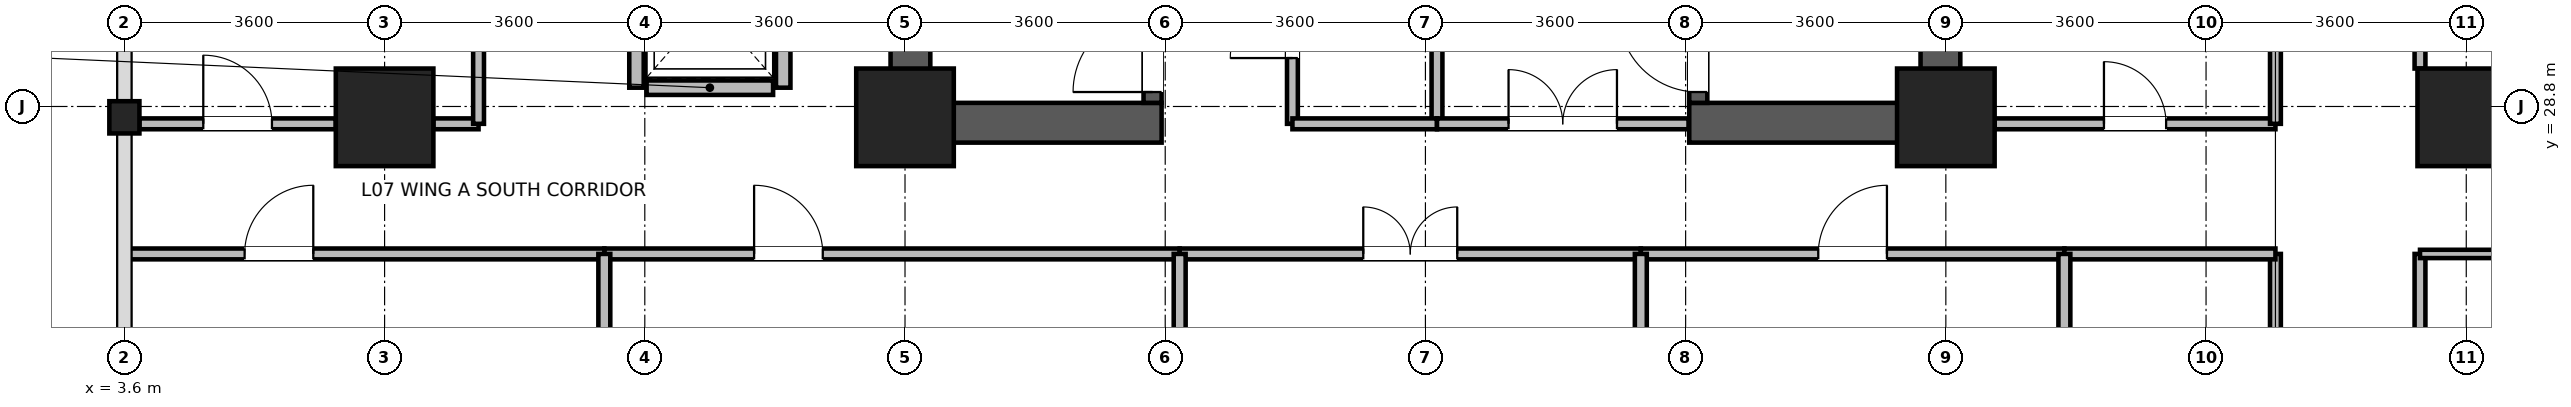
"""IFC4 building model, lengths in metres.
Left out: names, types, materials, properties, quantities, classifications, styles, units other than length and angle.
Written with IfcOpenShell. Run it as: python <this file> out.ifc"""

import sys

from ifc_helpers import new_model, si_unit, direction, frame, frame_2d, origin, origin_2d, place, context, subcontext, project, spatial, rectangle, i_section, extrude, source, transform, mapped, element, fill, save


model = new_model("IFC4")
c1 = context("Model", 3, precision=1e-05, world=origin(), true_north=direction((0.0, 1.0)))
c2 = subcontext(c1, "Body", "Model", "MODEL_VIEW")
j1 = project(units=[si_unit("LENGTHUNIT", "METRE"), si_unit("PLANEANGLEUNIT", "RADIAN")], contexts=[c1])
p1 = place(None, origin())
s1 = spatial("IfcSite", under=j1, at=p1, CompositionType="ELEMENT")
p2 = place(p1, origin())
s2 = spatial("IfcBuilding", under=s1, at=p2, CompositionType="ELEMENT")
p3 = place(p2, frame((0.0, 0.0, 32.7)))
s3 = spatial("IfcBuildingStorey", under=s2, at=p3, CompositionType="ELEMENT", Elevation=32.7)
for number, where, z_axis, x_axis in (
    (1, (14.475, 28.3, 0.0), (0.0, 0.0, 1.0), (0.0, 1.0, 0.0)),
    (2, (28.725, 28.3, 0.0), (0.0, 0.0, 1.0), (0.0, 1.0, 0.0)),
):
    element("IfcWall", number, at=place(p3, frame(where, z_axis=z_axis, x_axis=x_axis)), inside=s3, PredefinedType="SHEAR", context=c2, shape_type="SweptSolid", body=[
        extrude(rectangle(XDim=8.1, YDim=0.55, at=frame_2d((4.05, 0.0))), origin(), (0.0, 0.0, 1.0), 3.45),
    ])
for number, where, z_axis, x_axis in (
    (3, (14.75, 28.575, 0.0), (0.0, 0.0, 1.0), (1.0, 0.0, 0.0)),
    (4, (25.25, 28.575, 0.0), (0.0, 0.0, 1.0), (1.0, 0.0, 0.0)),
):
    element("IfcWall", number, at=place(p3, frame(where, z_axis=z_axis, x_axis=x_axis)), inside=s3, PredefinedType="SHEAR", context=c2, shape_type="SweptSolid", body=[
        extrude(rectangle(XDim=3.2, YDim=0.55, at=frame_2d((1.6, 0.0))), origin(), (0.0, 0.0, 1.0), 3.45),
    ])
p4 = place(p3, frame((17.825, 28.85, 0.0), z_axis=(0.0, 0.0, 1.0), x_axis=(0.0, 1.0, 0.0)))
e5 = element("IfcWall", 5, at=p4, inside=s3, PredefinedType="SHEAR", context=c2, shape_type="SweptSolid", body=[
    extrude(rectangle(XDim=7.0, YDim=0.25, at=frame_2d((3.5, 0.0))), origin(), (0.0, 0.0, 1.0), 3.45),
])
p5 = place(p4, frame((0.15, 0.0, 0.0)))
e6 = element("IfcOpeningElement", 6, at=p5, cuts=e5, PredefinedType="OPENING", context=c2, shape_type="SweptSolid", body=[
    extrude(rectangle(XDim=1.1, YDim=2.08, at=frame_2d((0.55, 1.04))), frame((0.0, 0.135, 0.0), z_axis=(0.0, -1.0, 0.0), x_axis=(1.0, 0.0, 0.0)), (0.0, 0.0, 1.0), 0.27),
])
p6 = place(p3, frame((25.375, 28.85, 0.0), z_axis=(0.0, 0.0, 1.0), x_axis=(0.0, 1.0, 0.0)))
e7 = element("IfcWall", 7, at=p6, inside=s3, PredefinedType="SHEAR", context=c2, shape_type="SweptSolid", body=[
    extrude(rectangle(XDim=7.0, YDim=0.25, at=frame_2d((3.5, 0.0))), origin(), (0.0, 0.0, 1.0), 3.45),
])
p7 = place(p6, frame((0.15, 0.0, 0.0)))
e8 = element("IfcOpeningElement", 8, at=p7, cuts=e7, PredefinedType="OPENING", context=c2, shape_type="SweptSolid", body=[
    extrude(rectangle(XDim=1.1, YDim=2.08, at=frame_2d((0.55, 1.04))), frame((0.0, 0.135, 0.0), z_axis=(0.0, -1.0, 0.0), x_axis=(1.0, 0.0, 0.0)), (0.0, 0.0, 1.0), 0.27),
])
m1 = source(origin(), c2, "Body", "SweptSolid", [
    extrude(rectangle(XDim=1.35, YDim=1.35, at=origin_2d()), origin(), (0.0, 0.0, 1.0), 3.7),
])
for number, where, z_axis, x_axis in (
    (9, (7.2, 28.65, 0.0), (0.0, 0.0, 1.0), (1.0, 0.0, 0.0)),
    (10, (14.4, 28.65, 0.0), (0.0, 0.0, 1.0), (1.0, 0.0, 0.0)),
    (11, (28.8, 28.65, 0.0), (0.0, 0.0, 1.0), (1.0, 0.0, 0.0)),
    (12, (36.0, 28.65, 0.0), (0.0, 0.0, 1.0), (1.0, 0.0, 0.0)),
):
    element("IfcColumn", number, at=place(p3, frame(where, z_axis=z_axis, x_axis=x_axis)), inside=s3, PredefinedType="COLUMN", context=c2, shape_type="MappedRepresentation", body=[
        mapped(m1, transform((0.0, 0.0, 0.0), x_axis=(1.0, 0.0, 0.0), y_axis=(0.0, 1.0, 0.0), z_axis=(0.0, 0.0, 1.0), scale=1.0)),
    ])
m2 = source(origin(), c2, "Body", "SweptSolid", [
    extrude(i_section(OverallWidth=0.416, OverallDepth=0.446, WebThickness=0.029, FlangeThickness=0.04, FilletRadius=0.015, at=origin_2d()), origin(), (0.0, 0.0, 1.0), 3.7),
])
p8 = place(p3, frame((3.6, 28.65, 0.0), z_axis=(0.0, 0.0, 1.0), x_axis=(1.0, 0.0, 0.0)))
e13 = element("IfcColumn", 13, at=p8, inside=s3, PredefinedType="COLUMN", context=c2, shape_type="MappedRepresentation", body=[
    mapped(m2, transform((0.0, 0.0, 0.0), x_axis=(1.0, 0.0, 0.0), y_axis=(0.0, 1.0, 0.0), z_axis=(0.0, 0.0, 1.0), scale=1.0)),
])
p9 = place(p3, frame((10.825, 29.06, 0.0), z_axis=(0.0, 0.0, 1.0), x_axis=(1.0, 0.0, 0.0)))
e14 = element("IfcWall", 14, at=p9, inside=s3, PredefinedType="PARTITIONING", context=c2, shape_type="SweptSolid", body=[
    extrude(rectangle(XDim=1.75, YDim=0.2, at=frame_2d((0.875, 0.0))), origin(), (0.0, 0.0, 1.0), 3.43),
])
for number, where, z_axis, x_axis in (
    (15, (10.685, 29.06, 0.0), (0.0, 0.0, 1.0), (0.0, 1.0, 0.0)),
    (16, (12.715, 29.06, 0.0), (0.0, 0.0, 1.0), (0.0, 1.0, 0.0)),
):
    element("IfcWall", number, at=place(p3, frame(where, z_axis=z_axis, x_axis=x_axis)), inside=s3, PredefinedType="PARTITIONING", context=c2, shape_type="SweptSolid", body=[
        extrude(rectangle(XDim=2.28, YDim=0.2, at=frame_2d((1.14, 0.0))), origin(), (0.0, 0.0, 1.0), 3.43),
    ])
p10 = place(p3, frame((35.36, 22.275, 0.0), z_axis=(0.0, 0.0, 1.0), x_axis=(0.0, 1.0, 0.0)))
e17 = element("IfcWall", 17, at=p10, inside=s3, PredefinedType="PARTITIONING", context=c2, shape_type="SweptSolid", body=[
    extrude(rectangle(XDim=4.485, YDim=0.15, at=frame_2d((2.243, 0.0))), origin(), (0.0, 0.0, 1.0), 3.43),
])
p11 = place(p3, frame((10.24, 26.76, 0.0), z_axis=(0.0, 0.0, 1.0), x_axis=(1.0, 0.0, 0.0)))
e18 = element("IfcWall", 18, at=p11, inside=s3, PredefinedType="PARTITIONING", context=c2, shape_type="SweptSolid", body=[
    extrude(rectangle(XDim=7.96, YDim=0.15, at=frame_2d((3.98, 0.0))), origin(), (0.0, 0.0, 1.0), 3.43),
])
p12 = place(p11, frame((2.072, 0.0, 0.0)))
e19 = element("IfcOpeningElement", 19, at=p12, cuts=e18, PredefinedType="OPENING", context=c2, shape_type="SweptSolid", body=[
    extrude(rectangle(XDim=0.95, YDim=2.1, at=frame_2d((0.475, 1.05))), frame((0.0, 0.085, 0.0), z_axis=(0.0, -1.0, 0.0), x_axis=(1.0, 0.0, 0.0)), (0.0, 0.0, 1.0), 0.17),
])
p13 = place(p3, frame((35.36, 29.325, 0.0), z_axis=(0.0, 0.0, 1.0), x_axis=(0.0, 1.0, 0.0)))
e20 = element("IfcWall", 20, at=p13, inside=s3, PredefinedType="PARTITIONING", context=c2, shape_type="SweptSolid", body=[
    extrude(rectangle(XDim=6.15, YDim=0.15, at=frame_2d((3.075, 0.0))), origin(), (0.0, 0.0, 1.0), 3.43),
])
p14 = place(p13, frame((2.425, 0.0, 0.0)))
e21 = element("IfcOpeningElement", 21, at=p14, cuts=e20, PredefinedType="OPENING", context=c2, shape_type="SweptSolid", body=[
    extrude(rectangle(XDim=1.3, YDim=2.12, at=frame_2d((0.65, 1.06))), frame((0.0, 0.085, 0.0), z_axis=(0.0, -1.0, 0.0), x_axis=(1.0, 0.0, 0.0)), (0.0, 0.0, 1.0), 0.17),
])
p15 = place(p3, frame((3.62, 26.76, 0.0), z_axis=(0.0, 0.0, 1.0), x_axis=(1.0, 0.0, 0.0)))
e22 = element("IfcWall", 22, at=p15, inside=s3, PredefinedType="PARTITIONING", context=c2, shape_type="SweptSolid", body=[
    extrude(rectangle(XDim=6.62, YDim=0.15, at=frame_2d((3.31, 0.0))), origin(), (0.0, 0.0, 1.0), 3.43),
])
p16 = place(p15, frame((1.643, 0.0, 0.0)))
e23 = element("IfcOpeningElement", 23, at=p16, cuts=e22, PredefinedType="OPENING", context=c2, shape_type="SweptSolid", body=[
    extrude(rectangle(XDim=0.95, YDim=2.1, at=frame_2d((0.475, 1.05))), frame((0.0, 0.085, 0.0), z_axis=(0.0, -1.0, 0.0), x_axis=(1.0, 0.0, 0.0)), (0.0, 0.0, 1.0), 0.17),
])
p17 = place(p3, frame((18.2, 26.76, 0.0), z_axis=(0.0, 0.0, 1.0), x_axis=(1.0, 0.0, 0.0)))
e24 = element("IfcWall", 24, at=p17, inside=s3, PredefinedType="PARTITIONING", context=c2, shape_type="SweptSolid", body=[
    extrude(rectangle(XDim=6.38, YDim=0.15, at=frame_2d((3.19, 0.0))), origin(), (0.0, 0.0, 1.0), 3.43),
])
p18 = place(p17, frame((2.54, 0.0, 0.0)))
e25 = element("IfcOpeningElement", 25, at=p18, cuts=e24, PredefinedType="OPENING", context=c2, shape_type="SweptSolid", body=[
    extrude(rectangle(XDim=1.3, YDim=2.12, at=frame_2d((0.65, 1.06))), frame((0.0, 0.085, 0.0), z_axis=(0.0, -1.0, 0.0), x_axis=(1.0, 0.0, 0.0)), (0.0, 0.0, 1.0), 0.17),
])
p19 = place(p3, frame((24.58, 26.76, 0.0), z_axis=(0.0, 0.0, 1.0), x_axis=(1.0, 0.0, 0.0)))
e26 = element("IfcWall", 26, at=p19, inside=s3, PredefinedType="PARTITIONING", context=c2, shape_type="SweptSolid", body=[
    extrude(rectangle(XDim=5.86, YDim=0.15, at=frame_2d((2.93, 0.0))), origin(), (0.0, 0.0, 1.0), 3.43),
])
p20 = place(p19, frame((2.455, 0.0, 0.0)))
e27 = element("IfcOpeningElement", 27, at=p20, cuts=e26, PredefinedType="OPENING", context=c2, shape_type="SweptSolid", body=[
    extrude(rectangle(XDim=0.95, YDim=2.1, at=frame_2d((0.475, 1.05))), frame((0.0, 0.085, 0.0), z_axis=(0.0, -1.0, 0.0), x_axis=(1.0, 0.0, 0.0)), (0.0, 0.0, 1.0), 0.17),
])
p21 = place(p3, frame((33.36, 21.6, 0.0), z_axis=(0.0, 0.0, 1.0), x_axis=(0.0, 1.0, 0.0)))
e28 = element("IfcWall", 28, at=p21, inside=s3, PredefinedType="PARTITIONING", context=c2, shape_type="SweptSolid", body=[
    extrude(rectangle(XDim=5.16, YDim=0.15, at=frame_2d((2.58, 0.0))), origin(), (0.0, 0.0, 1.0), 3.43),
])
p22 = place(p21, frame((2.15, 0.0, 0.0)))
e29 = element("IfcOpeningElement", 29, at=p22, cuts=e28, PredefinedType="OPENING", context=c2, shape_type="SweptSolid", body=[
    extrude(rectangle(XDim=0.86, YDim=2.02, at=frame_2d((0.43, 1.01))), frame((0.0, 0.085, 0.0), z_axis=(0.0, -1.0, 0.0), x_axis=(1.0, 0.0, 0.0)), (0.0, 0.0, 1.0), 0.17),
])
p23 = place(p3, frame((3.808, 28.56, 0.0), z_axis=(0.0, 0.0, 1.0), x_axis=(1.0, 0.0, 0.0)))
e30 = element("IfcWall", 30, at=p23, inside=s3, PredefinedType="PARTITIONING", context=c2, shape_type="SweptSolid", body=[
    extrude(rectangle(XDim=2.717, YDim=0.15, at=frame_2d((1.358, 0.0))), origin(), (0.0, 0.0, 1.0), 2.78),
])
p24 = place(p23, frame((0.884, 0.0, 0.0)))
e31 = element("IfcOpeningElement", 31, at=p24, cuts=e30, PredefinedType="OPENING", context=c2, shape_type="SweptSolid", body=[
    extrude(rectangle(XDim=0.95, YDim=2.1, at=frame_2d((0.475, 1.05))), frame((0.0, 0.085, 0.0), z_axis=(0.0, -1.0, 0.0), x_axis=(1.0, 0.0, 0.0)), (0.0, 0.0, 1.0), 0.17),
])
p25 = place(p3, frame((7.875, 28.56, 0.0), z_axis=(0.0, 0.0, 1.0), x_axis=(1.0, 0.0, 0.0)))
e32 = element("IfcWall", 32, at=p25, inside=s3, PredefinedType="PARTITIONING", context=c2, shape_type="SweptSolid", body=[
    extrude(rectangle(XDim=0.625, YDim=0.15, at=frame_2d((0.312, 0.0))), origin(), (0.0, 0.0, 1.0), 2.78),
])
p26 = place(p3, frame((29.475, 28.56, 0.0), z_axis=(0.0, 0.0, 1.0), x_axis=(1.0, 0.0, 0.0)))
e33 = element("IfcWall", 33, at=p26, inside=s3, PredefinedType="PARTITIONING", context=c2, shape_type="SweptSolid", body=[
    extrude(rectangle(XDim=3.885, YDim=0.15, at=frame_2d((1.942, 0.0))), origin(), (0.0, 0.0, 1.0), 2.78),
])
p27 = place(p26, frame((1.512, 0.0, 0.0)))
e34 = element("IfcOpeningElement", 34, at=p27, cuts=e33, PredefinedType="OPENING", context=c2, shape_type="SweptSolid", body=[
    extrude(rectangle(XDim=0.86, YDim=2.02, at=frame_2d((0.43, 1.01))), frame((0.0, 0.085, 0.0), z_axis=(0.0, -1.0, 0.0), x_axis=(1.0, 0.0, 0.0)), (0.0, 0.0, 1.0), 0.17),
])
p28 = place(p3, frame((8.5, 28.56, 0.0), z_axis=(0.0, 0.0, 1.0), x_axis=(0.0, 1.0, 0.0)))
e35 = element("IfcWall", 35, at=p28, inside=s3, PredefinedType="PARTITIONING", context=c2, shape_type="SweptSolid", body=[
    extrude(rectangle(XDim=3.84, YDim=0.15, at=frame_2d((1.92, 0.0))), origin(), (0.0, 0.0, 1.0), 3.43),
])
p29 = place(p3, frame((33.36, 28.56, 0.0), z_axis=(0.0, 0.0, 1.0), x_axis=(0.0, 1.0, 0.0)))
e36 = element("IfcWall", 36, at=p29, inside=s3, PredefinedType="PARTITIONING", context=c2, shape_type="SweptSolid", body=[
    extrude(rectangle(XDim=3.08, YDim=0.15, at=frame_2d((1.54, 0.0))), origin(), (0.0, 0.0, 1.0), 3.43),
])
p30 = place(p3, frame((30.44, 26.76, 0.0), z_axis=(0.0, 0.0, 1.0), x_axis=(1.0, 0.0, 0.0)))
e37 = element("IfcWall", 37, at=p30, inside=s3, PredefinedType="PARTITIONING", context=c2, shape_type="SweptSolid", body=[
    extrude(rectangle(XDim=2.92, YDim=0.15, at=frame_2d((1.46, 0.0))), origin(), (0.0, 0.0, 1.0), 3.43),
])
p31 = place(p3, frame((19.76, 28.56, 0.0), z_axis=(0.0, 0.0, 1.0), x_axis=(0.0, 1.0, 0.0)))
e38 = element("IfcWall", 38, at=p31, inside=s3, PredefinedType="PARTITIONING", context=c2, shape_type="SweptSolid", body=[
    extrude(rectangle(XDim=2.68, YDim=0.15, at=frame_2d((1.34, 0.0))), origin(), (0.0, 0.0, 1.0), 3.43),
])
p32 = place(p31, frame((0.91, 0.0, 0.0)))
e39 = element("IfcOpeningElement", 39, at=p32, cuts=e38, PredefinedType="OPENING", context=c2, shape_type="SweptSolid", body=[
    extrude(rectangle(XDim=0.86, YDim=2.02, at=frame_2d((0.43, 1.01))), frame((0.0, 0.085, 0.0), z_axis=(0.0, -1.0, 0.0), x_axis=(1.0, 0.0, 0.0)), (0.0, 0.0, 1.0), 0.17),
])
p33 = place(p3, frame((21.76, 28.56, 0.0), z_axis=(0.0, 0.0, 1.0), x_axis=(0.0, 1.0, 0.0)))
e40 = element("IfcWall", 40, at=p33, inside=s3, PredefinedType="PARTITIONING", context=c2, shape_type="SweptSolid", body=[
    extrude(rectangle(XDim=2.68, YDim=0.15, at=frame_2d((1.34, 0.0))), origin(), (0.0, 0.0, 1.0), 3.43),
])
p34 = place(p3, frame((19.76, 28.56, 0.0), z_axis=(0.0, 0.0, 1.0), x_axis=(1.0, 0.0, 0.0)))
e41 = element("IfcWall", 41, at=p34, inside=s3, PredefinedType="PARTITIONING", context=c2, shape_type="SweptSolid", body=[
    extrude(rectangle(XDim=2.0, YDim=0.15, at=frame_2d((1.0, 0.0))), origin(), (0.0, 0.0, 1.0), 2.23),
])
p35 = place(p3, frame((18.2, 21.732, 0.0), z_axis=(0.0, 0.0, 1.0), x_axis=(0.0, 1.0, 0.0)))
e42 = element("IfcWall", 42, at=p35, inside=s3, PredefinedType="PARTITIONING", context=c2, shape_type="SweptSolid", body=[
    extrude(rectangle(XDim=5.028, YDim=0.165, at=frame_2d((2.514, 0.0))), origin(), (0.0, 0.0, 1.0), 3.07),
])
p36 = place(p3, frame((24.58, 21.732, 0.0), z_axis=(0.0, 0.0, 1.0), x_axis=(0.0, 1.0, 0.0)))
e43 = element("IfcWall", 43, at=p36, inside=s3, PredefinedType="PARTITIONING", context=c2, shape_type="SweptSolid", body=[
    extrude(rectangle(XDim=5.028, YDim=0.165, at=frame_2d((2.514, 0.0))), origin(), (0.0, 0.0, 1.0), 3.43),
])
p37 = place(p3, frame((30.44, 21.6, 0.0), z_axis=(0.0, 0.0, 1.0), x_axis=(0.0, 1.0, 0.0)))
e44 = element("IfcWall", 44, at=p37, inside=s3, PredefinedType="PARTITIONING", context=c2, shape_type="SweptSolid", body=[
    extrude(rectangle(XDim=5.16, YDim=0.165, at=frame_2d((2.58, 0.0))), origin(), (0.0, 0.0, 1.0), 3.43),
])
p38 = place(p3, frame((35.36, 26.76, 0.0), z_axis=(0.0, 0.0, 1.0), x_axis=(1.0, 0.0, 0.0)))
e45 = element("IfcWall", 45, at=p38, inside=s3, PredefinedType="PARTITIONING", context=c2, shape_type="SweptSolid", body=[
    extrude(rectangle(XDim=4.92, YDim=0.115, at=frame_2d((2.46, 0.0))), origin(), (0.0, 0.0, 1.0), 3.43),
])
p39 = place(p3, frame((21.76, 28.56, 0.0), z_axis=(0.0, 0.0, 1.0), x_axis=(1.0, 0.0, 0.0)))
e46 = element("IfcWall", 46, at=p39, inside=s3, PredefinedType="PARTITIONING", context=c2, shape_type="SweptSolid", body=[
    extrude(rectangle(XDim=3.48, YDim=0.15, at=frame_2d((1.74, 0.0))), origin(), (0.0, 0.0, 1.0), 2.23),
])
p40 = place(p39, frame((0.99, 0.0, 0.0)))
e47 = element("IfcOpeningElement", 47, at=p40, cuts=e46, PredefinedType="OPENING", context=c2, shape_type="SweptSolid", body=[
    extrude(rectangle(XDim=1.5, YDim=2.1, at=frame_2d((0.75, 1.05))), frame((0.0, 0.085, 0.0), z_axis=(0.0, -1.0, 0.0), x_axis=(1.0, 0.0, 0.0)), (0.0, 0.0, 1.0), 0.17),
])
p41 = place(p3, frame((10.24, 23.5, 0.0), z_axis=(0.0, 0.0, 1.0), x_axis=(0.0, 1.0, 0.0)))
e48 = element("IfcWall", 48, at=p41, inside=s3, PredefinedType="PARTITIONING", context=c2, shape_type="SweptSolid", body=[
    extrude(rectangle(XDim=3.26, YDim=0.165, at=frame_2d((1.63, 0.0))), origin(), (0.0, 0.0, 1.0), 3.43),
])
p42 = place(p5, origin())
e49 = element("IfcDoor", 49, at=p42, inside=s3, OperationType="SINGLE_SWING_LEFT", PredefinedType="DOOR", context=c2, shape_type="SweptSolid", body=[
    extrude(rectangle(XDim=1.1, YDim=2.08, at=frame_2d((0.55, 1.04))), frame((0.0, 0.025, 0.0), z_axis=(0.0, -1.0, 0.0), x_axis=(1.0, 0.0, 0.0)), (0.0, 0.0, 1.0), 0.05),
])
fill(e6, e49)
p43 = place(p7, origin())
e50 = element("IfcDoor", 50, at=p43, inside=s3, OperationType="SINGLE_SWING_RIGHT", PredefinedType="DOOR", context=c2, shape_type="SweptSolid", body=[
    extrude(rectangle(XDim=1.1, YDim=2.08, at=frame_2d((0.55, 1.04))), frame((0.0, 0.025, 0.0), z_axis=(0.0, -1.0, 0.0), x_axis=(1.0, 0.0, 0.0)), (0.0, 0.0, 1.0), 0.05),
])
fill(e8, e50)
p44 = place(p12, origin())
e51 = element("IfcDoor", 51, at=p44, inside=s3, OperationType="SINGLE_SWING_LEFT", PredefinedType="DOOR", context=c2, shape_type="SweptSolid", body=[
    extrude(rectangle(XDim=0.95, YDim=2.1, at=frame_2d((0.475, 1.05))), frame((0.0, 0.025, 0.0), z_axis=(0.0, -1.0, 0.0), x_axis=(1.0, 0.0, 0.0)), (0.0, 0.0, 1.0), 0.05),
])
fill(e19, e51)
p45 = place(p16, origin())
e52 = element("IfcDoor", 52, at=p45, inside=s3, OperationType="SINGLE_SWING_RIGHT", PredefinedType="DOOR", context=c2, shape_type="SweptSolid", body=[
    extrude(rectangle(XDim=0.95, YDim=2.1, at=frame_2d((0.475, 1.05))), frame((0.0, 0.025, 0.0), z_axis=(0.0, -1.0, 0.0), x_axis=(1.0, 0.0, 0.0)), (0.0, 0.0, 1.0), 0.05),
])
fill(e23, e52)
p46 = place(p18, origin())
e53 = element("IfcDoor", 53, at=p46, inside=s3, OperationType="DOUBLE_DOOR_SINGLE_SWING", PredefinedType="DOOR", context=c2, shape_type="SweptSolid", body=[
    extrude(rectangle(XDim=1.3, YDim=2.12, at=frame_2d((0.65, 1.06))), frame((0.0, 0.025, 0.0), z_axis=(0.0, -1.0, 0.0), x_axis=(1.0, 0.0, 0.0)), (0.0, 0.0, 1.0), 0.05),
])
fill(e25, e53)
p47 = place(p20, origin())
e54 = element("IfcDoor", 54, at=p47, inside=s3, OperationType="SINGLE_SWING_RIGHT", PredefinedType="DOOR", context=c2, shape_type="SweptSolid", body=[
    extrude(rectangle(XDim=0.95, YDim=2.1, at=frame_2d((0.475, 1.05))), frame((0.0, 0.025, 0.0), z_axis=(0.0, -1.0, 0.0), x_axis=(1.0, 0.0, 0.0)), (0.0, 0.0, 1.0), 0.05),
])
fill(e27, e54)
p48 = place(p24, origin())
e55 = element("IfcDoor", 55, at=p48, inside=s3, OperationType="SINGLE_SWING_LEFT", PredefinedType="DOOR", context=c2, shape_type="SweptSolid", body=[
    extrude(rectangle(XDim=0.95, YDim=2.1, at=frame_2d((0.475, 1.05))), frame((0.0, 0.025, 0.0), z_axis=(0.0, -1.0, 0.0), x_axis=(1.0, 0.0, 0.0)), (0.0, 0.0, 1.0), 0.05),
])
fill(e31, e55)
p49 = place(p27, origin())
e56 = element("IfcDoor", 56, at=p49, inside=s3, OperationType="SINGLE_SWING_LEFT", PredefinedType="DOOR", context=c2, shape_type="SweptSolid", body=[
    extrude(rectangle(XDim=0.86, YDim=2.02, at=frame_2d((0.43, 1.01))), frame((0.0, 0.025, 0.0), z_axis=(0.0, -1.0, 0.0), x_axis=(1.0, 0.0, 0.0)), (0.0, 0.0, 1.0), 0.05),
])
fill(e34, e56)
p50 = place(p32, origin())
e57 = element("IfcDoor", 57, at=p50, inside=s3, OperationType="SINGLE_SWING_LEFT", PredefinedType="DOOR", context=c2, shape_type="SweptSolid", body=[
    extrude(rectangle(XDim=0.86, YDim=2.02, at=frame_2d((0.43, 1.01))), frame((0.0, 0.025, 0.0), z_axis=(0.0, -1.0, 0.0), x_axis=(1.0, 0.0, 0.0)), (0.0, 0.0, 1.0), 0.05),
])
fill(e39, e57)
p51 = place(p40, origin())
e58 = element("IfcDoor", 58, at=p51, inside=s3, OperationType="DOUBLE_DOOR_SINGLE_SWING", PredefinedType="DOOR", context=c2, shape_type="SweptSolid", body=[
    extrude(rectangle(XDim=1.5, YDim=2.1, at=frame_2d((0.75, 1.05))), frame((0.0, 0.025, 0.0), z_axis=(0.0, -1.0, 0.0), x_axis=(1.0, 0.0, 0.0)), (0.0, 0.0, 1.0), 0.05),
])
fill(e47, e58)
save(model, sys.argv[1])
